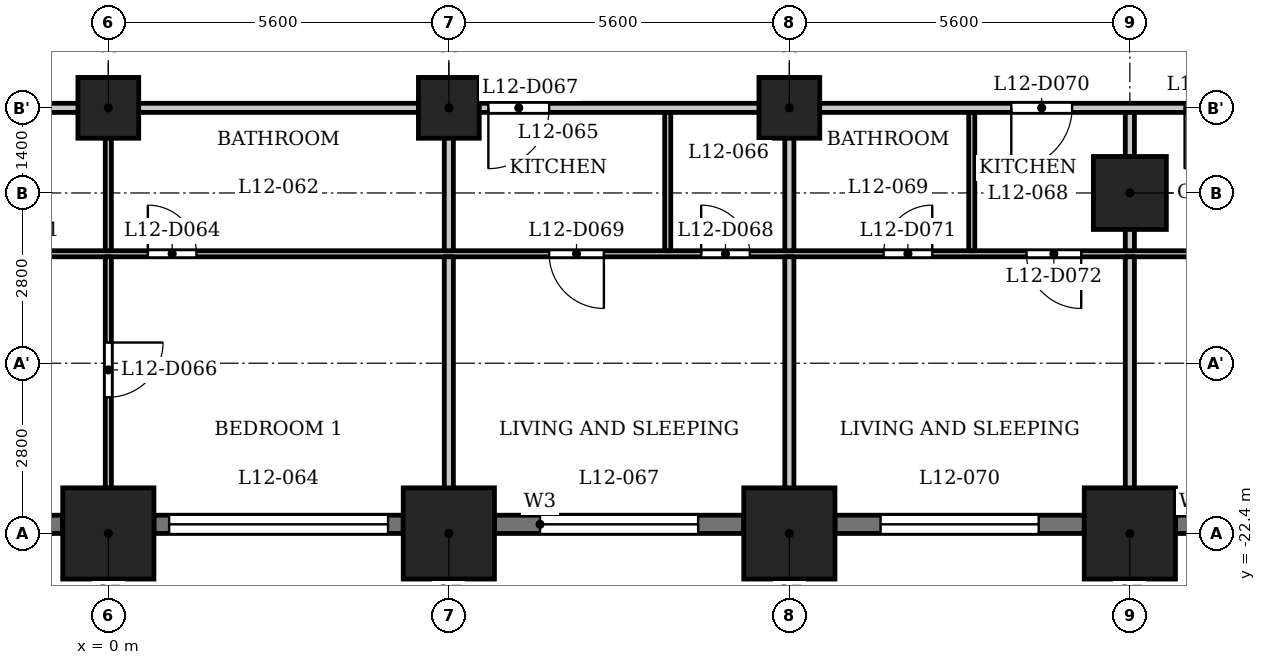
"""IFC4 building model, lengths in metres.
Left out: names, types, materials, properties, quantities, classifications, styles, units other than length and angle.
Written with IfcOpenShell. Run it as: python <this file> out.ifc"""

import sys

from ifc_helpers import new_model, si_unit, direction, frame, frame_2d, origin, origin_2d, place, context, subcontext, project, spatial, rectangle, extrude, element, fill, save


model = new_model("IFC4")
c1 = context("Model", 3, precision=1e-05, world=origin(), true_north=direction((0.0, 1.0)))
c2 = subcontext(c1, "Body", "Model", "MODEL_VIEW")
j1 = project(units=[si_unit("LENGTHUNIT", "METRE"), si_unit("PLANEANGLEUNIT", "RADIAN")], contexts=[c1])
p1 = place(None, origin())
s1 = spatial("IfcSite", under=j1, at=p1, CompositionType="ELEMENT")
p2 = place(p1, origin())
s2 = spatial("IfcBuilding", under=s1, at=p2, CompositionType="ELEMENT")
p3 = place(p2, frame((0.0, 0.0, 51.5)))
s3 = spatial("IfcBuildingStorey", under=s2, at=p3, CompositionType="ELEMENT", Elevation=51.5)
for number, where, z_axis, x_axis in (
    (1, (0.0, -22.4, 0.0), (0.0, 0.0, 1.0), (1.0, 0.0, 0.0)),
    (2, (5.6, -22.4, 0.0), (0.0, 0.0, 1.0), (1.0, 0.0, 0.0)),
    (3, (11.2, -22.4, 0.0), (0.0, 0.0, 1.0), (1.0, 0.0, 0.0)),
    (4, (16.8, -22.4, 0.0), (0.0, 0.0, 1.0), (1.0, 0.0, 0.0)),
):
    element("IfcColumn", number, at=place(p3, frame(where, z_axis=z_axis, x_axis=x_axis)), inside=s3, PredefinedType="COLUMN", context=c2, shape_type="SweptSolid", body=[
        extrude(rectangle(XDim=1.5, YDim=1.5, at=origin_2d()), origin(), (0.0, 0.0, 1.0), 3.5),
    ])
p4 = place(p3, frame((16.8, -16.8, 0.0), z_axis=(0.0, 0.0, 1.0), x_axis=(1.0, 0.0, 0.0)))
e5 = element("IfcColumn", 5, at=p4, inside=s3, PredefinedType="COLUMN", context=c2, shape_type="SweptSolid", body=[
    extrude(rectangle(XDim=1.2, YDim=1.2, at=origin_2d()), origin(), (0.0, 0.0, 1.0), 3.5),
])
for number, where, z_axis, x_axis in (
    (6, (0.0, -15.4, 0.0), (0.0, 0.0, 1.0), (1.0, 0.0, 0.0)),
    (7, (5.6, -15.4, 0.0), (0.0, 0.0, 1.0), (1.0, 0.0, 0.0)),
    (8, (11.2, -15.4, 0.0), (0.0, 0.0, 1.0), (1.0, 0.0, 0.0)),
):
    element("IfcColumn", number, at=place(p3, frame(where, z_axis=z_axis, x_axis=x_axis)), inside=s3, PredefinedType="COLUMN", context=c2, shape_type="SweptSolid", body=[
        extrude(rectangle(XDim=1.0, YDim=1.0, at=origin_2d()), origin(), (0.0, 0.0, 1.0), 3.5),
    ])
p5 = place(p3, frame((-4.85, -22.25, 0.0), z_axis=(0.0, 0.0, 1.0), x_axis=(1.0, 0.0, 0.0)))
e9 = element("IfcWall", 9, at=p5, inside=s3, PredefinedType="SOLIDWALL", context=c2, shape_type="SweptSolid", body=[
    extrude(rectangle(XDim=4.1, YDim=0.3, at=frame_2d((2.05, 0.0))), origin(), (0.0, 0.0, 1.0), 2.35),
])
p6 = place(p5, frame((0.25, 0.0, 1.2)))
e10 = element("IfcOpeningElement", 10, at=p6, cuts=e9, PredefinedType="OPENING", context=c2, shape_type="SweptSolid", body=[
    extrude(rectangle(XDim=3.6, YDim=0.95, at=frame_2d((1.8, 0.475))), frame((0.0, 0.16, 0.0), z_axis=(0.0, -1.0, 0.0), x_axis=(1.0, 0.0, 0.0)), (0.0, 0.0, 1.0), 0.32),
])
p7 = place(p3, frame((0.75, -22.25, 0.0), z_axis=(0.0, 0.0, 1.0), x_axis=(1.0, 0.0, 0.0)))
e11 = element("IfcWall", 11, at=p7, inside=s3, PredefinedType="SOLIDWALL", context=c2, shape_type="SweptSolid", body=[
    extrude(rectangle(XDim=4.1, YDim=0.3, at=frame_2d((2.05, 0.0))), origin(), (0.0, 0.0, 1.0), 2.35),
])
p8 = place(p7, frame((0.25, 0.0, 1.2)))
e12 = element("IfcOpeningElement", 12, at=p8, cuts=e11, PredefinedType="OPENING", context=c2, shape_type="SweptSolid", body=[
    extrude(rectangle(XDim=3.6, YDim=0.95, at=frame_2d((1.8, 0.475))), frame((0.0, 0.16, 0.0), z_axis=(0.0, -1.0, 0.0), x_axis=(1.0, 0.0, 0.0)), (0.0, 0.0, 1.0), 0.32),
])
p9 = place(p3, frame((6.35, -22.25, 0.0), z_axis=(0.0, 0.0, 1.0), x_axis=(1.0, 0.0, 0.0)))
e13 = element("IfcWall", 13, at=p9, inside=s3, PredefinedType="SOLIDWALL", context=c2, shape_type="SweptSolid", body=[
    extrude(rectangle(XDim=4.1, YDim=0.3, at=frame_2d((2.05, 0.0))), origin(), (0.0, 0.0, 1.0), 2.35),
])
p10 = place(p9, frame((0.75, 0.0, 0.9)))
e14 = element("IfcOpeningElement", 14, at=p10, cuts=e13, PredefinedType="OPENING", context=c2, shape_type="SweptSolid", body=[
    extrude(rectangle(XDim=2.6, YDim=1.25, at=frame_2d((1.3, 0.625))), frame((0.0, 0.16, 0.0), z_axis=(0.0, -1.0, 0.0), x_axis=(1.0, 0.0, 0.0)), (0.0, 0.0, 1.0), 0.32),
])
p11 = place(p3, frame((11.95, -22.25, 0.0), z_axis=(0.0, 0.0, 1.0), x_axis=(1.0, 0.0, 0.0)))
e15 = element("IfcWall", 15, at=p11, inside=s3, PredefinedType="SOLIDWALL", context=c2, shape_type="SweptSolid", body=[
    extrude(rectangle(XDim=4.1, YDim=0.3, at=frame_2d((2.05, 0.0))), origin(), (0.0, 0.0, 1.0), 2.35),
])
p12 = place(p11, frame((0.75, 0.0, 0.9)))
e16 = element("IfcOpeningElement", 16, at=p12, cuts=e15, PredefinedType="OPENING", context=c2, shape_type="SweptSolid", body=[
    extrude(rectangle(XDim=2.6, YDim=1.25, at=frame_2d((1.3, 0.625))), frame((0.0, 0.16, 0.0), z_axis=(0.0, -1.0, 0.0), x_axis=(1.0, 0.0, 0.0)), (0.0, 0.0, 1.0), 0.32),
])
p13 = place(p3, frame((17.55, -22.25, 0.0), z_axis=(0.0, 0.0, 1.0), x_axis=(1.0, 0.0, 0.0)))
e17 = element("IfcWall", 17, at=p13, inside=s3, PredefinedType="SOLIDWALL", context=c2, shape_type="SweptSolid", body=[
    extrude(rectangle(XDim=2.45, YDim=0.3, at=frame_2d((1.225, 0.0))), origin(), (0.0, 0.0, 1.0), 2.35),
])
p14 = place(p13, frame((0.325, 0.0, 0.9)))
e18 = element("IfcOpeningElement", 18, at=p14, cuts=e17, PredefinedType="OPENING", context=c2, shape_type="SweptSolid", body=[
    extrude(rectangle(XDim=1.8, YDim=1.25, at=frame_2d((0.9, 0.625))), frame((0.0, 0.16, 0.0), z_axis=(0.0, -1.0, 0.0), x_axis=(1.0, 0.0, 0.0)), (0.0, 0.0, 1.0), 0.32),
])
p15 = place(p3, frame((-26.394, -17.8, 0.0), z_axis=(0.0, 0.0, 1.0), x_axis=(1.0, 0.0, 0.0)))
e19 = element("IfcWall", 19, at=p15, inside=s3, PredefinedType="PARTITIONING", context=c2, shape_type="SweptSolid", body=[
    extrude(rectangle(XDim=53.126, YDim=0.1, at=frame_2d((26.563, 0.0))), origin(), (0.0, 0.0, 1.0), 3.2),
])
p16 = place(p15, frame((0.794, 0.0, 0.0)))
e20 = element("IfcOpeningElement", 20, at=p16, cuts=e19, PredefinedType="OPENING", context=c2, shape_type="SweptSolid", body=[
    extrude(rectangle(XDim=0.8, YDim=2.1, at=frame_2d((0.4, 1.05))), frame((0.0, 0.06, 0.0), z_axis=(0.0, -1.0, 0.0), x_axis=(1.0, 0.0, 0.0)), (0.0, 0.0, 1.0), 0.12),
])
p17 = place(p15, frame((5.644, 0.0, 0.0)))
e21 = element("IfcOpeningElement", 21, at=p17, cuts=e19, PredefinedType="OPENING", context=c2, shape_type="SweptSolid", body=[
    extrude(rectangle(XDim=0.9, YDim=2.1, at=frame_2d((0.45, 1.05))), frame((0.0, 0.06, 0.0), z_axis=(0.0, -1.0, 0.0), x_axis=(1.0, 0.0, 0.0)), (0.0, 0.0, 1.0), 0.12),
])
p18 = place(p15, frame((19.344, 0.0, 0.0)))
e22 = element("IfcOpeningElement", 22, at=p18, cuts=e19, PredefinedType="OPENING", context=c2, shape_type="SweptSolid", body=[
    extrude(rectangle(XDim=0.8, YDim=2.1, at=frame_2d((0.4, 1.05))), frame((0.0, 0.06, 0.0), z_axis=(0.0, -1.0, 0.0), x_axis=(1.0, 0.0, 0.0)), (0.0, 0.0, 1.0), 0.12),
])
p19 = place(p15, frame((17.094, 0.0, 0.0)))
e23 = element("IfcOpeningElement", 23, at=p19, cuts=e19, PredefinedType="OPENING", context=c2, shape_type="SweptSolid", body=[
    extrude(rectangle(XDim=0.9, YDim=2.1, at=frame_2d((0.45, 1.05))), frame((0.0, 0.06, 0.0), z_axis=(0.0, -1.0, 0.0), x_axis=(1.0, 0.0, 0.0)), (0.0, 0.0, 1.0), 0.12),
])
p20 = place(p15, frame((10.494, 0.0, 0.0)))
e24 = element("IfcOpeningElement", 24, at=p20, cuts=e19, PredefinedType="OPENING", context=c2, shape_type="SweptSolid", body=[
    extrude(rectangle(XDim=0.9, YDim=2.1, at=frame_2d((0.45, 1.05))), frame((0.0, 0.06, 0.0), z_axis=(0.0, -1.0, 0.0), x_axis=(1.0, 0.0, 0.0)), (0.0, 0.0, 1.0), 0.12),
])
p21 = place(p15, frame((13.294, 0.0, 0.0)))
e25 = element("IfcOpeningElement", 25, at=p21, cuts=e19, PredefinedType="OPENING", context=c2, shape_type="SweptSolid", body=[
    extrude(rectangle(XDim=0.9, YDim=2.1, at=frame_2d((0.45, 1.05))), frame((0.0, 0.06, 0.0), z_axis=(0.0, -1.0, 0.0), x_axis=(1.0, 0.0, 0.0)), (0.0, 0.0, 1.0), 0.12),
])
p22 = place(p15, frame((27.044, 0.0, 0.0)))
e26 = element("IfcOpeningElement", 26, at=p22, cuts=e19, PredefinedType="OPENING", context=c2, shape_type="SweptSolid", body=[
    extrude(rectangle(XDim=0.8, YDim=2.1, at=frame_2d((0.4, 1.05))), frame((0.0, 0.06, 0.0), z_axis=(0.0, -1.0, 0.0), x_axis=(1.0, 0.0, 0.0)), (0.0, 0.0, 1.0), 0.12),
])
p23 = place(p15, frame((22.444, 0.0, 0.0)))
e27 = element("IfcOpeningElement", 27, at=p23, cuts=e19, PredefinedType="OPENING", context=c2, shape_type="SweptSolid", body=[
    extrude(rectangle(XDim=0.9, YDim=2.1, at=frame_2d((0.45, 1.05))), frame((0.0, 0.06, 0.0), z_axis=(0.0, -1.0, 0.0), x_axis=(1.0, 0.0, 0.0)), (0.0, 0.0, 1.0), 0.12),
])
p24 = place(p15, frame((36.144, 0.0, 0.0)))
e28 = element("IfcOpeningElement", 28, at=p24, cuts=e19, PredefinedType="OPENING", context=c2, shape_type="SweptSolid", body=[
    extrude(rectangle(XDim=0.8, YDim=2.1, at=frame_2d((0.4, 1.05))), frame((0.0, 0.06, 0.0), z_axis=(0.0, -1.0, 0.0), x_axis=(1.0, 0.0, 0.0)), (0.0, 0.0, 1.0), 0.12),
])
p25 = place(p15, frame((33.644, 0.0, 0.0)))
e29 = element("IfcOpeningElement", 29, at=p25, cuts=e19, PredefinedType="OPENING", context=c2, shape_type="SweptSolid", body=[
    extrude(rectangle(XDim=0.9, YDim=2.1, at=frame_2d((0.45, 1.05))), frame((0.0, 0.06, 0.0), z_axis=(0.0, -1.0, 0.0), x_axis=(1.0, 0.0, 0.0)), (0.0, 0.0, 1.0), 0.12),
])
p26 = place(p15, frame((39.144, 0.0, 0.0)))
e30 = element("IfcOpeningElement", 30, at=p26, cuts=e19, PredefinedType="OPENING", context=c2, shape_type="SweptSolid", body=[
    extrude(rectangle(XDim=0.8, YDim=2.1, at=frame_2d((0.4, 1.05))), frame((0.0, 0.06, 0.0), z_axis=(0.0, -1.0, 0.0), x_axis=(1.0, 0.0, 0.0)), (0.0, 0.0, 1.0), 0.12),
])
p27 = place(p15, frame((41.494, 0.0, 0.0)))
e31 = element("IfcOpeningElement", 31, at=p27, cuts=e19, PredefinedType="OPENING", context=c2, shape_type="SweptSolid", body=[
    extrude(rectangle(XDim=0.9, YDim=2.1, at=frame_2d((0.45, 1.05))), frame((0.0, 0.06, 0.0), z_axis=(0.0, -1.0, 0.0), x_axis=(1.0, 0.0, 0.0)), (0.0, 0.0, 1.0), 0.12),
])
p28 = place(p15, frame((49.362, 0.0, 0.0)))
e32 = element("IfcOpeningElement", 32, at=p28, cuts=e19, PredefinedType="OPENING", context=c2, shape_type="SweptSolid", body=[
    extrude(rectangle(XDim=0.8, YDim=2.1, at=frame_2d((0.4, 1.05))), frame((0.0, 0.06, 0.0), z_axis=(0.0, -1.0, 0.0), x_axis=(1.0, 0.0, 0.0)), (0.0, 0.0, 1.0), 0.12),
])
p29 = place(p15, frame((45.094, 0.0, 0.0)))
e33 = element("IfcOpeningElement", 33, at=p29, cuts=e19, PredefinedType="OPENING", context=c2, shape_type="SweptSolid", body=[
    extrude(rectangle(XDim=0.9, YDim=2.1, at=frame_2d((0.45, 1.05))), frame((0.0, 0.06, 0.0), z_axis=(0.0, -1.0, 0.0), x_axis=(1.0, 0.0, 0.0)), (0.0, 0.0, 1.0), 0.12),
])
p30 = place(p3, frame((-27.484, -15.4, 0.0), z_axis=(0.0, 0.0, 1.0), x_axis=(1.0, 0.0, 0.0)))
e34 = element("IfcWall", 34, at=p30, inside=s3, PredefinedType="PARTITIONING", context=c2, shape_type="SweptSolid", body=[
    extrude(rectangle(XDim=54.968, YDim=0.15, at=frame_2d((27.484, 0.0))), origin(), (0.0, 0.0, 1.0), 3.2),
])
p31 = place(p30, frame((5.734, 0.0, 0.0)))
e35 = element("IfcOpeningElement", 35, at=p31, cuts=e34, PredefinedType="OPENING", context=c2, shape_type="SweptSolid", body=[
    extrude(rectangle(XDim=1.0, YDim=2.1, at=frame_2d((0.5, 1.05))), frame((0.0, 0.085, 0.0), z_axis=(0.0, -1.0, 0.0), x_axis=(1.0, 0.0, 0.0)), (0.0, 0.0, 1.0), 0.17),
])
p32 = place(p30, frame((11.584, 0.0, 0.0)))
e36 = element("IfcOpeningElement", 36, at=p32, cuts=e34, PredefinedType="OPENING", context=c2, shape_type="SweptSolid", body=[
    extrude(rectangle(XDim=1.0, YDim=2.1, at=frame_2d((0.5, 1.05))), frame((0.0, 0.085, 0.0), z_axis=(0.0, -1.0, 0.0), x_axis=(1.0, 0.0, 0.0)), (0.0, 0.0, 1.0), 0.17),
])
p33 = place(p30, frame((22.534, 0.0, 0.0)))
e37 = element("IfcOpeningElement", 37, at=p33, cuts=e34, PredefinedType="OPENING", context=c2, shape_type="SweptSolid", body=[
    extrude(rectangle(XDim=1.0, YDim=2.1, at=frame_2d((0.5, 1.05))), frame((0.0, 0.085, 0.0), z_axis=(0.0, -1.0, 0.0), x_axis=(1.0, 0.0, 0.0)), (0.0, 0.0, 1.0), 0.17),
])
p34 = place(p30, frame((33.734, 0.0, 0.0)))
e38 = element("IfcOpeningElement", 38, at=p34, cuts=e34, PredefinedType="OPENING", context=c2, shape_type="SweptSolid", body=[
    extrude(rectangle(XDim=1.0, YDim=2.1, at=frame_2d((0.5, 1.05))), frame((0.0, 0.085, 0.0), z_axis=(0.0, -1.0, 0.0), x_axis=(1.0, 0.0, 0.0)), (0.0, 0.0, 1.0), 0.17),
])
p35 = place(p30, frame((42.334, 0.0, 0.0)))
e39 = element("IfcOpeningElement", 39, at=p35, cuts=e34, PredefinedType="OPENING", context=c2, shape_type="SweptSolid", body=[
    extrude(rectangle(XDim=1.0, YDim=2.1, at=frame_2d((0.5, 1.05))), frame((0.0, 0.085, 0.0), z_axis=(0.0, -1.0, 0.0), x_axis=(1.0, 0.0, 0.0)), (0.0, 0.0, 1.0), 0.17),
])
p36 = place(p30, frame((45.184, 0.0, 0.0)))
e40 = element("IfcOpeningElement", 40, at=p36, cuts=e34, PredefinedType="OPENING", context=c2, shape_type="SweptSolid", body=[
    extrude(rectangle(XDim=1.0, YDim=2.1, at=frame_2d((0.5, 1.05))), frame((0.0, 0.085, 0.0), z_axis=(0.0, -1.0, 0.0), x_axis=(1.0, 0.0, 0.0)), (0.0, 0.0, 1.0), 0.17),
])
p37 = place(p3, frame((0.0, -23.13, 0.0), z_axis=(0.0, 0.0, 1.0), x_axis=(0.0, 1.0, 0.0)))
e41 = element("IfcWall", 41, at=p37, inside=s3, PredefinedType="PARTITIONING", context=c2, shape_type="SweptSolid", body=[
    extrude(rectangle(XDim=5.28, YDim=0.1, at=frame_2d((2.64, 0.0))), origin(), (0.0, 0.0, 1.0), 3.2),
])
p38 = place(p37, frame((2.97, 0.0, 0.0)))
e42 = element("IfcOpeningElement", 42, at=p38, cuts=e41, PredefinedType="OPENING", context=c2, shape_type="SweptSolid", body=[
    extrude(rectangle(XDim=0.9, YDim=2.1, at=frame_2d((0.45, 1.05))), frame((0.0, 0.06, 0.0), z_axis=(0.0, -1.0, 0.0), x_axis=(1.0, 0.0, 0.0)), (0.0, 0.0, 1.0), 0.12),
])
p39 = place(p3, frame((0.0, -17.75, 0.0), z_axis=(0.0, 0.0, 1.0), x_axis=(0.0, 1.0, 0.0)))
e43 = element("IfcWall", 43, at=p39, inside=s3, PredefinedType="PARTITIONING", context=c2, shape_type="SweptSolid", body=[
    extrude(rectangle(XDim=2.275, YDim=0.1, at=frame_2d((1.137, 0.0))), origin(), (0.0, 0.0, 1.0), 3.2),
])
p40 = place(p3, frame((5.6, -23.13, 0.0), z_axis=(0.0, 0.0, 1.0), x_axis=(0.0, 1.0, 0.0)))
e44 = element("IfcWall", 44, at=p40, inside=s3, PredefinedType="PARTITIONING", context=c2, shape_type="SweptSolid", body=[
    extrude(rectangle(XDim=5.28, YDim=0.15, at=frame_2d((2.64, 0.0))), origin(), (0.0, 0.0, 1.0), 3.2),
])
p41 = place(p3, frame((5.6, -17.75, 0.0), z_axis=(0.0, 0.0, 1.0), x_axis=(0.0, 1.0, 0.0)))
e45 = element("IfcWall", 45, at=p41, inside=s3, PredefinedType="PARTITIONING", context=c2, shape_type="SweptSolid", body=[
    extrude(rectangle(XDim=2.275, YDim=0.15, at=frame_2d((1.137, 0.0))), origin(), (0.0, 0.0, 1.0), 3.2),
])
p42 = place(p3, frame((9.2, -17.75, 0.0), z_axis=(0.0, 0.0, 1.0), x_axis=(0.0, 1.0, 0.0)))
e46 = element("IfcWall", 46, at=p42, inside=s3, PredefinedType="PARTITIONING", context=c2, shape_type="SweptSolid", body=[
    extrude(rectangle(XDim=2.275, YDim=0.1, at=frame_2d((1.137, 0.0))), origin(), (0.0, 0.0, 1.0), 3.2),
])
p43 = place(p3, frame((11.2, -23.13, 0.0), z_axis=(0.0, 0.0, 1.0), x_axis=(0.0, 1.0, 0.0)))
e47 = element("IfcWall", 47, at=p43, inside=s3, PredefinedType="PARTITIONING", context=c2, shape_type="SweptSolid", body=[
    extrude(rectangle(XDim=5.28, YDim=0.15, at=frame_2d((2.64, 0.0))), origin(), (0.0, 0.0, 1.0), 3.2),
])
p44 = place(p3, frame((11.2, -17.75, 0.0), z_axis=(0.0, 0.0, 1.0), x_axis=(0.0, 1.0, 0.0)))
e48 = element("IfcWall", 48, at=p44, inside=s3, PredefinedType="PARTITIONING", context=c2, shape_type="SweptSolid", body=[
    extrude(rectangle(XDim=2.275, YDim=0.15, at=frame_2d((1.137, 0.0))), origin(), (0.0, 0.0, 1.0), 3.2),
])
p45 = place(p3, frame((14.2, -17.75, 0.0), z_axis=(0.0, 0.0, 1.0), x_axis=(0.0, 1.0, 0.0)))
e49 = element("IfcWall", 49, at=p45, inside=s3, PredefinedType="PARTITIONING", context=c2, shape_type="SweptSolid", body=[
    extrude(rectangle(XDim=2.275, YDim=0.1, at=frame_2d((1.137, 0.0))), origin(), (0.0, 0.0, 1.0), 3.2),
])
p46 = place(p3, frame((16.8, -23.13, 0.0), z_axis=(0.0, 0.0, 1.0), x_axis=(0.0, 1.0, 0.0)))
e50 = element("IfcWall", 50, at=p46, inside=s3, PredefinedType="PARTITIONING", context=c2, shape_type="SweptSolid", body=[
    extrude(rectangle(XDim=5.28, YDim=0.15, at=frame_2d((2.64, 0.0))), origin(), (0.0, 0.0, 1.0), 3.2),
])
p47 = place(p3, frame((16.8, -17.75, 0.0), z_axis=(0.0, 0.0, 1.0), x_axis=(0.0, 1.0, 0.0)))
e51 = element("IfcWall", 51, at=p47, inside=s3, PredefinedType="PARTITIONING", context=c2, shape_type="SweptSolid", body=[
    extrude(rectangle(XDim=2.275, YDim=0.15, at=frame_2d((1.137, 0.0))), origin(), (0.0, 0.0, 1.0), 3.2),
])
p48 = place(p22, origin())
e52 = element("IfcDoor", 52, at=p48, inside=s3, OperationType="SINGLE_SWING_RIGHT", PredefinedType="DOOR", context=c2, shape_type="SweptSolid", body=[
    extrude(rectangle(XDim=0.8, YDim=2.1, at=frame_2d((0.4, 1.05))), frame((0.0, 0.025, 0.0), z_axis=(0.0, -1.0, 0.0), x_axis=(1.0, 0.0, 0.0)), (0.0, 0.0, 1.0), 0.05),
])
fill(e26, e52)
p49 = place(p38, origin())
e53 = element("IfcDoor", 53, at=p49, inside=s3, OperationType="SINGLE_SWING_RIGHT", PredefinedType="DOOR", context=c2, shape_type="SweptSolid", body=[
    extrude(rectangle(XDim=0.9, YDim=2.1, at=frame_2d((0.45, 1.05))), frame((0.0, 0.025, 0.0), z_axis=(0.0, -1.0, 0.0), x_axis=(1.0, 0.0, 0.0)), (0.0, 0.0, 1.0), 0.05),
])
fill(e42, e53)
p50 = place(p34, origin())
e54 = element("IfcDoor", 54, at=p50, inside=s3, OperationType="SINGLE_SWING_LEFT", PredefinedType="DOOR", context=c2, shape_type="SweptSolid", body=[
    extrude(rectangle(XDim=1.0, YDim=2.1, at=frame_2d((0.5, 1.05))), frame((0.0, 0.025, 0.0), z_axis=(0.0, -1.0, 0.0), x_axis=(1.0, 0.0, 0.0)), (0.0, 0.0, 1.0), 0.05),
])
fill(e38, e54)
p51 = place(p24, origin())
e55 = element("IfcDoor", 55, at=p51, inside=s3, OperationType="SINGLE_SWING_RIGHT", PredefinedType="DOOR", context=c2, shape_type="SweptSolid", body=[
    extrude(rectangle(XDim=0.8, YDim=2.1, at=frame_2d((0.4, 1.05))), frame((0.0, 0.025, 0.0), z_axis=(0.0, -1.0, 0.0), x_axis=(1.0, 0.0, 0.0)), (0.0, 0.0, 1.0), 0.05),
])
fill(e28, e55)
p52 = place(p25, origin())
e56 = element("IfcDoor", 56, at=p52, inside=s3, OperationType="SINGLE_SWING_RIGHT", PredefinedType="DOOR", context=c2, shape_type="SweptSolid", body=[
    extrude(rectangle(XDim=0.9, YDim=2.1, at=frame_2d((0.45, 1.05))), frame((0.0, 0.025, 0.0), z_axis=(0.0, -1.0, 0.0), x_axis=(1.0, 0.0, 0.0)), (0.0, 0.0, 1.0), 0.05),
])
fill(e29, e56)
p53 = place(p35, origin())
e57 = element("IfcDoor", 57, at=p53, inside=s3, OperationType="SINGLE_SWING_LEFT", PredefinedType="DOOR", context=c2, shape_type="SweptSolid", body=[
    extrude(rectangle(XDim=1.0, YDim=2.1, at=frame_2d((0.5, 1.05))), frame((0.0, 0.025, 0.0), z_axis=(0.0, -1.0, 0.0), x_axis=(1.0, 0.0, 0.0)), (0.0, 0.0, 1.0), 0.05),
])
fill(e39, e57)
p54 = place(p26, origin())
e58 = element("IfcDoor", 58, at=p54, inside=s3, OperationType="SINGLE_SWING_LEFT", PredefinedType="DOOR", context=c2, shape_type="SweptSolid", body=[
    extrude(rectangle(XDim=0.8, YDim=2.1, at=frame_2d((0.4, 1.05))), frame((0.0, 0.025, 0.0), z_axis=(0.0, -1.0, 0.0), x_axis=(1.0, 0.0, 0.0)), (0.0, 0.0, 1.0), 0.05),
])
fill(e30, e58)
p55 = place(p27, origin())
e59 = element("IfcDoor", 59, at=p55, inside=s3, OperationType="SINGLE_SWING_RIGHT", PredefinedType="DOOR", context=c2, shape_type="SweptSolid", body=[
    extrude(rectangle(XDim=0.9, YDim=2.1, at=frame_2d((0.45, 1.05))), frame((0.0, 0.025, 0.0), z_axis=(0.0, -1.0, 0.0), x_axis=(1.0, 0.0, 0.0)), (0.0, 0.0, 1.0), 0.05),
])
fill(e31, e59)
p56 = place(p36, origin())
e60 = element("IfcDoor", 60, at=p56, inside=s3, OperationType="SINGLE_SWING_LEFT", PredefinedType="DOOR", context=c2, shape_type="SweptSolid", body=[
    extrude(rectangle(XDim=1.0, YDim=2.1, at=frame_2d((0.5, 1.05))), frame((0.0, 0.025, 0.0), z_axis=(0.0, -1.0, 0.0), x_axis=(1.0, 0.0, 0.0)), (0.0, 0.0, 1.0), 0.05),
])
fill(e40, e60)
p57 = place(p8, origin())
e61 = element("IfcWindow", 61, at=p57, inside=s3, PartitioningType="SINGLE_PANEL", PredefinedType="WINDOW", context=c2, shape_type="SweptSolid", body=[
    extrude(rectangle(XDim=3.6, YDim=0.95, at=frame_2d((1.8, 0.475))), frame((0.0, 0.03, 0.0), z_axis=(0.0, -1.0, 0.0), x_axis=(1.0, 0.0, 0.0)), (0.0, 0.0, 1.0), 0.06),
])
fill(e12, e61)
p58 = place(p10, origin())
e62 = element("IfcWindow", 62, at=p58, inside=s3, PartitioningType="SINGLE_PANEL", PredefinedType="WINDOW", context=c2, shape_type="SweptSolid", body=[
    extrude(rectangle(XDim=2.6, YDim=1.25, at=frame_2d((1.3, 0.625))), frame((0.0, 0.03, 0.0), z_axis=(0.0, -1.0, 0.0), x_axis=(1.0, 0.0, 0.0)), (0.0, 0.0, 1.0), 0.06),
])
fill(e14, e62)
p59 = place(p12, origin())
e63 = element("IfcWindow", 63, at=p59, inside=s3, PartitioningType="SINGLE_PANEL", PredefinedType="WINDOW", context=c2, shape_type="SweptSolid", body=[
    extrude(rectangle(XDim=2.6, YDim=1.25, at=frame_2d((1.3, 0.625))), frame((0.0, 0.03, 0.0), z_axis=(0.0, -1.0, 0.0), x_axis=(1.0, 0.0, 0.0)), (0.0, 0.0, 1.0), 0.06),
])
fill(e16, e63)
save(model, sys.argv[1])
